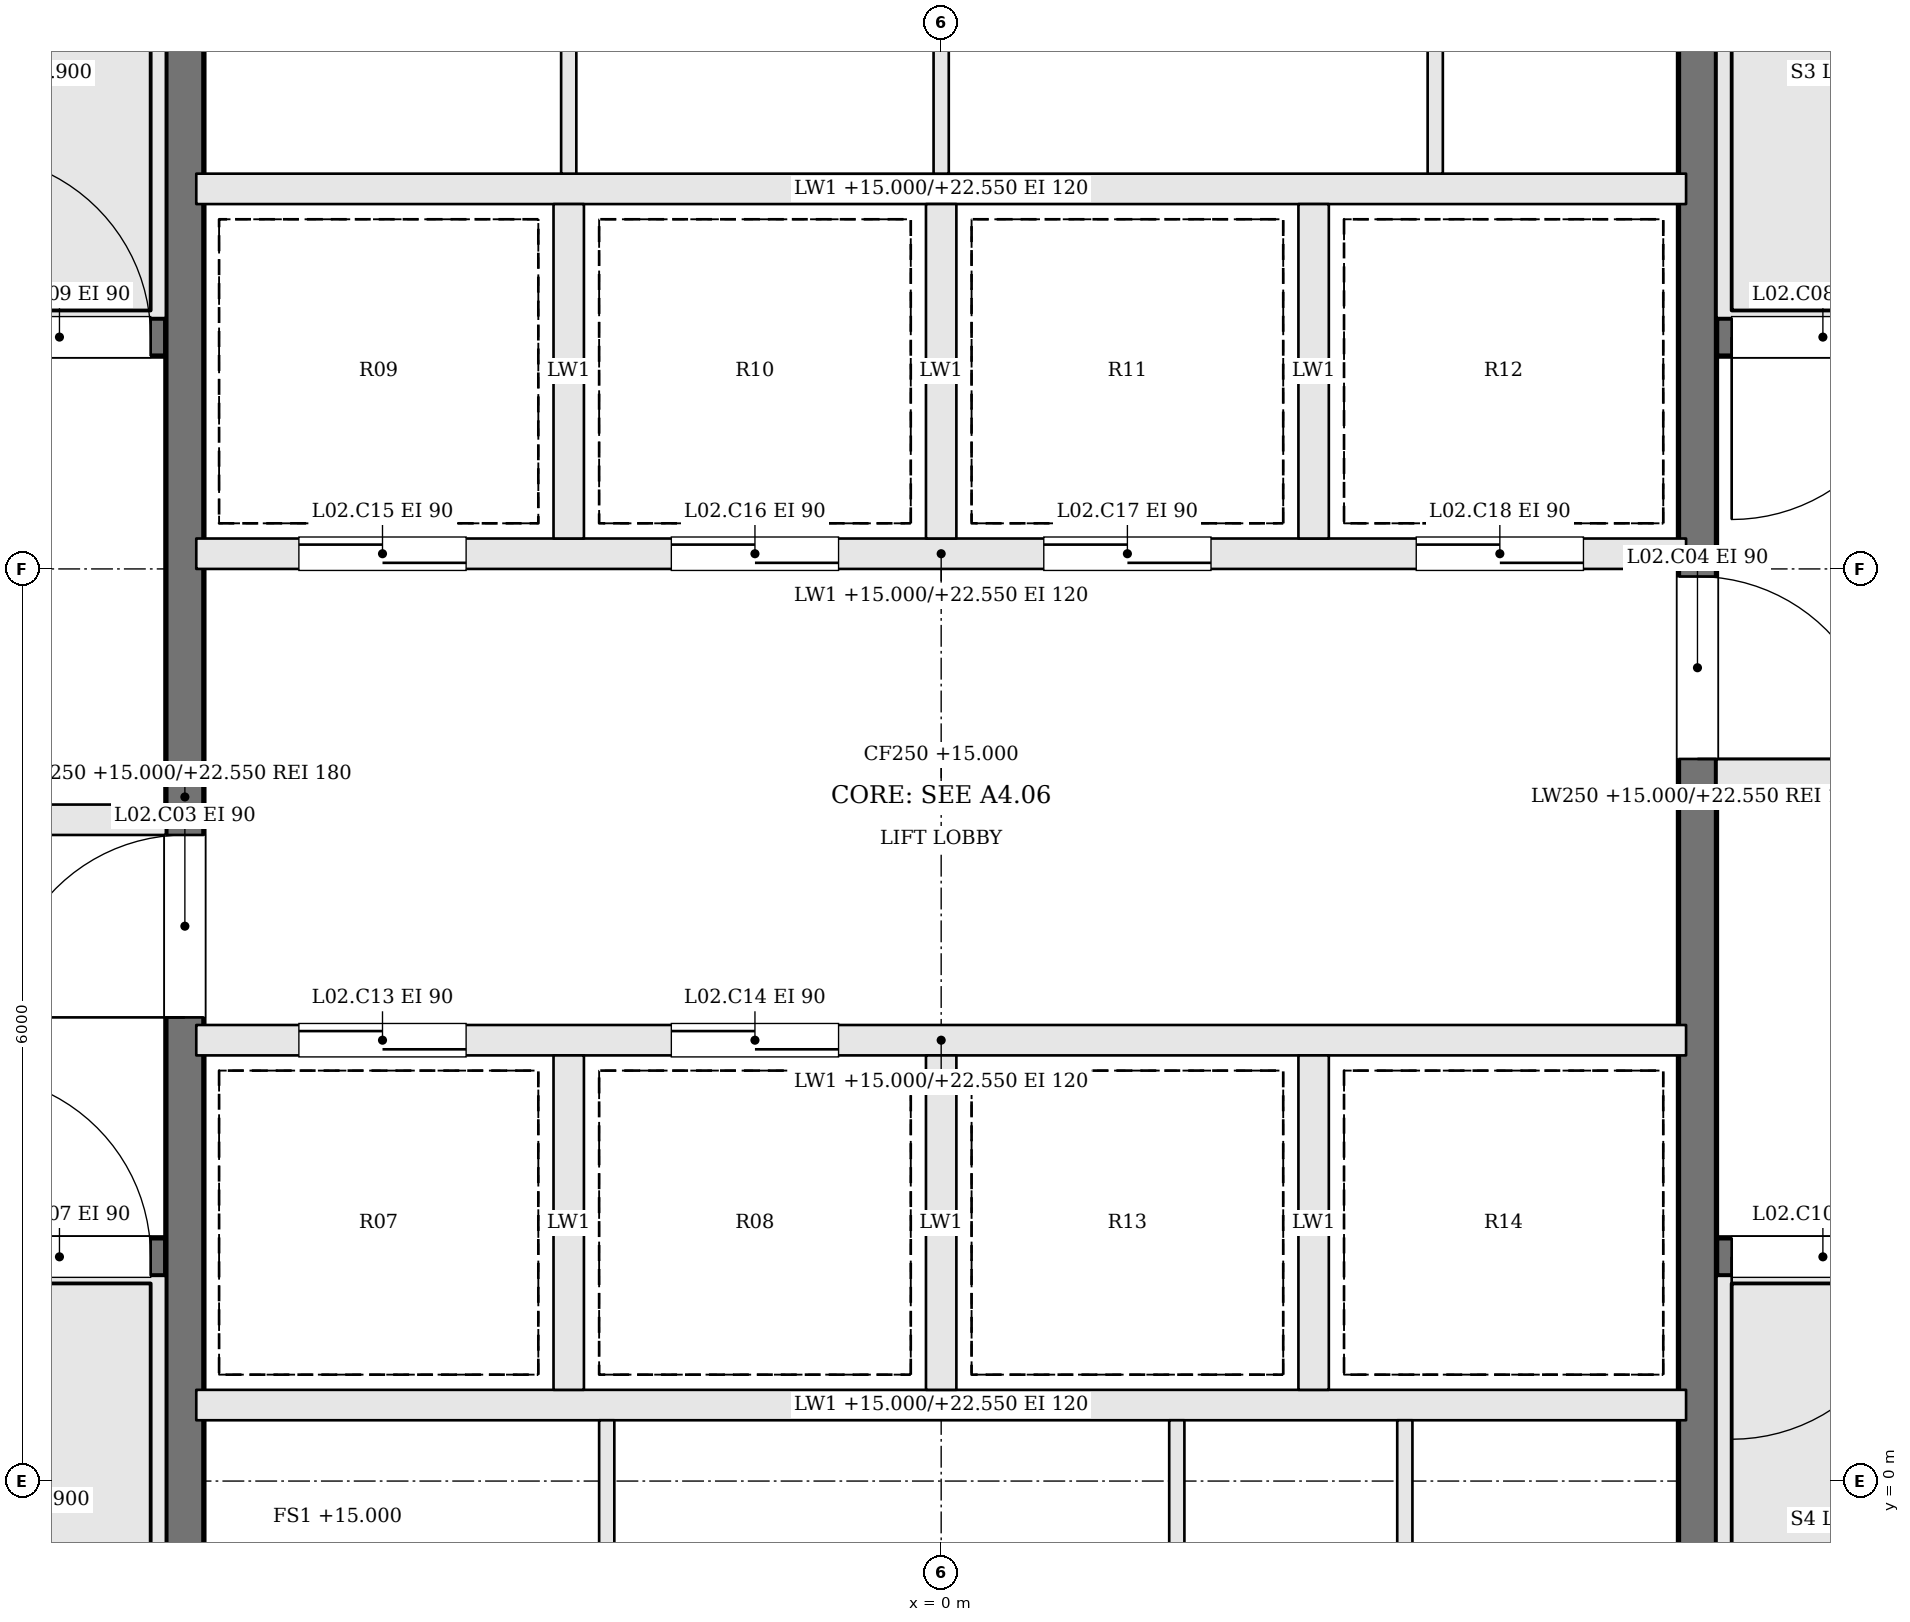
"""IFC4 building model, lengths in metres.
Left out: names, types, materials, properties, quantities, classifications, styles, units other than length and angle.
Written with IfcOpenShell. Run it as: python <this file> out.ifc"""

import sys

from ifc_helpers import new_model, si_unit, direction, frame, frame_2d, origin, place, context, subcontext, project, spatial, rectangle, extrude, element, fill, save


model = new_model("IFC4")
c1 = context("Model", 3, precision=1e-05, world=origin(), true_north=direction((0.0, 1.0)))
c2 = subcontext(c1, "Body", "Model", "MODEL_VIEW")
j1 = project(units=[si_unit("LENGTHUNIT", "METRE"), si_unit("PLANEANGLEUNIT", "RADIAN")], contexts=[c1])
p1 = place(None, origin())
s1 = spatial("IfcSite", under=j1, at=p1, CompositionType="ELEMENT")
p2 = place(p1, origin())
s2 = spatial("IfcBuilding", under=s1, at=p2, CompositionType="ELEMENT")
p3 = place(p2, frame((0.0, 0.0, 15.0)))
s3 = spatial("IfcBuildingStorey", under=s2, at=p3, CompositionType="ELEMENT", Elevation=15.0)
p4 = place(p3, frame((-11.6, 1.475, 0.0), z_axis=(0.0, 0.0, 1.0), x_axis=(1.0, 0.0, 0.0)))
e1 = element("IfcWall", 1, at=p4, inside=s3, PredefinedType="SOLIDWALL", context=c2, shape_type="SweptSolid", body=[
    extrude(rectangle(XDim=6.5, YDim=0.25, at=frame_2d((3.25, 0.0))), origin(), (0.0, 0.0, 1.0), 7.55),
])
p5 = place(p4, frame((5.2, 0.0, 0.0)))
e2 = element("IfcOpeningElement", 2, at=p5, cuts=e1, PredefinedType="OPENING", context=c2, shape_type="SweptSolid", body=[
    extrude(rectangle(XDim=1.2, YDim=2.1, at=frame_2d((0.6, 1.05))), frame((0.0, 0.135, 0.0), z_axis=(0.0, -1.0, 0.0), x_axis=(1.0, 0.0, 0.0)), (0.0, 0.0, 1.0), 0.27),
])
p6 = place(p3, frame((11.6, 7.525, 0.0), z_axis=(0.0, 0.0, 1.0), x_axis=(-1.0, 0.0, 0.0)))
e3 = element("IfcWall", 3, at=p6, inside=s3, PredefinedType="SOLIDWALL", context=c2, shape_type="SweptSolid", body=[
    extrude(rectangle(XDim=6.5, YDim=0.25, at=frame_2d((3.25, 0.0))), origin(), (0.0, 0.0, 1.0), 7.55),
])
p7 = place(p6, frame((5.2, 0.0, 0.0)))
e4 = element("IfcOpeningElement", 4, at=p7, cuts=e3, PredefinedType="OPENING", context=c2, shape_type="SweptSolid", body=[
    extrude(rectangle(XDim=1.2, YDim=2.1, at=frame_2d((0.6, 1.05))), frame((0.0, 0.135, 0.0), z_axis=(0.0, -1.0, 0.0), x_axis=(1.0, 0.0, 0.0)), (0.0, 0.0, 1.0), 0.27),
])
p8 = place(p3, frame((-11.6, 4.35, 0.0), z_axis=(0.0, 0.0, 1.0), x_axis=(1.0, 0.0, 0.0)))
e5 = element("IfcWall", 5, at=p8, inside=s3, PredefinedType="SOLIDWALL", context=c2, shape_type="SweptSolid", body=[
    extrude(rectangle(XDim=6.5, YDim=0.2, at=frame_2d((3.25, 0.0))), origin(), (0.0, 0.0, 1.0), 7.55),
])
p9 = place(p8, frame((3.8, 0.0, 0.0)))
e6 = element("IfcOpeningElement", 6, at=p9, cuts=e5, PredefinedType="OPENING", context=c2, shape_type="SweptSolid", body=[
    extrude(rectangle(XDim=1.2, YDim=2.1, at=frame_2d((0.6, 1.05))), frame((0.0, 0.11, 0.0), z_axis=(0.0, -1.0, 0.0), x_axis=(1.0, 0.0, 0.0)), (0.0, 0.0, 1.0), 0.22),
])
p10 = place(p8, frame((0.5, 0.0, 0.0)))
e7 = element("IfcOpeningElement", 7, at=p10, cuts=e5, PredefinedType="OPENING", context=c2, shape_type="SweptSolid", body=[
    extrude(rectangle(XDim=1.2, YDim=2.1, at=frame_2d((0.6, 1.05))), frame((0.0, 0.11, 0.0), z_axis=(0.0, -1.0, 0.0), x_axis=(1.0, 0.0, 0.0)), (0.0, 0.0, 1.0), 0.22),
])
p11 = place(p3, frame((11.6, 4.65, 0.0), z_axis=(0.0, 0.0, 1.0), x_axis=(-1.0, 0.0, 0.0)))
e8 = element("IfcWall", 8, at=p11, inside=s3, PredefinedType="SOLIDWALL", context=c2, shape_type="SweptSolid", body=[
    extrude(rectangle(XDim=6.5, YDim=0.2, at=frame_2d((3.25, 0.0))), origin(), (0.0, 0.0, 1.0), 7.55),
])
p12 = place(p11, frame((3.8, 0.0, 0.0)))
e9 = element("IfcOpeningElement", 9, at=p12, cuts=e8, PredefinedType="OPENING", context=c2, shape_type="SweptSolid", body=[
    extrude(rectangle(XDim=1.2, YDim=2.1, at=frame_2d((0.6, 1.05))), frame((0.0, 0.11, 0.0), z_axis=(0.0, -1.0, 0.0), x_axis=(1.0, 0.0, 0.0)), (0.0, 0.0, 1.0), 0.22),
])
p13 = place(p11, frame((0.5, 0.0, 0.0)))
e10 = element("IfcOpeningElement", 10, at=p13, cuts=e8, PredefinedType="OPENING", context=c2, shape_type="SweptSolid", body=[
    extrude(rectangle(XDim=1.2, YDim=2.1, at=frame_2d((0.6, 1.05))), frame((0.0, 0.11, 0.0), z_axis=(0.0, -1.0, 0.0), x_axis=(1.0, 0.0, 0.0)), (0.0, 0.0, 1.0), 0.22),
])
p14 = place(p3, frame((-11.6, 7.525, 0.0), z_axis=(0.0, 0.0, 1.0), x_axis=(1.0, 0.0, 0.0)))
e11 = element("IfcWall", 11, at=p14, inside=s3, PredefinedType="SOLIDWALL", context=c2, shape_type="SweptSolid", body=[
    extrude(rectangle(XDim=6.5, YDim=0.25, at=frame_2d((3.25, 0.0))), origin(), (0.0, 0.0, 1.0), 7.55),
])
p15 = place(p14, frame((5.2, 0.0, 0.0)))
e12 = element("IfcOpeningElement", 12, at=p15, cuts=e11, PredefinedType="OPENING", context=c2, shape_type="SweptSolid", body=[
    extrude(rectangle(XDim=1.2, YDim=2.1, at=frame_2d((0.6, 1.05))), frame((0.0, 0.135, 0.0), z_axis=(0.0, -1.0, 0.0), x_axis=(1.0, 0.0, 0.0)), (0.0, 0.0, 1.0), 0.27),
])
p16 = place(p3, frame((11.6, 1.475, 0.0), z_axis=(0.0, 0.0, 1.0), x_axis=(-1.0, 0.0, 0.0)))
e13 = element("IfcWall", 13, at=p16, inside=s3, PredefinedType="SOLIDWALL", context=c2, shape_type="SweptSolid", body=[
    extrude(rectangle(XDim=6.5, YDim=0.25, at=frame_2d((3.25, 0.0))), origin(), (0.0, 0.0, 1.0), 7.55),
])
p17 = place(p16, frame((5.2, 0.0, 0.0)))
e14 = element("IfcOpeningElement", 14, at=p17, cuts=e13, PredefinedType="OPENING", context=c2, shape_type="SweptSolid", body=[
    extrude(rectangle(XDim=1.2, YDim=2.1, at=frame_2d((0.6, 1.05))), frame((0.0, 0.135, 0.0), z_axis=(0.0, -1.0, 0.0), x_axis=(1.0, 0.0, 0.0)), (0.0, 0.0, 1.0), 0.27),
])
p18 = place(p3, frame((-4.975, -1.6, 0.0), z_axis=(0.0, 0.0, 1.0), x_axis=(0.0, 1.0, 0.0)))
e15 = element("IfcWall", 15, at=p18, inside=s3, PredefinedType="SOLIDWALL", context=c2, shape_type="SweptSolid", body=[
    extrude(rectangle(XDim=12.2, YDim=0.25, at=frame_2d((6.1, 0.0))), origin(), (0.0, 0.0, 1.0), 7.55),
])
p19 = place(p18, frame((4.65, 0.0, 0.0)))
e16 = element("IfcOpeningElement", 16, at=p19, cuts=e15, PredefinedType="OPENING", context=c2, shape_type="SweptSolid", body=[
    extrude(rectangle(XDim=1.2, YDim=2.1, at=frame_2d((0.6, 1.05))), frame((0.0, 0.135, 0.0), z_axis=(0.0, -1.0, 0.0), x_axis=(1.0, 0.0, 0.0)), (0.0, 0.0, 1.0), 0.27),
])
p20 = place(p3, frame((4.975, 10.6, 0.0), z_axis=(0.0, 0.0, 1.0), x_axis=(0.0, -1.0, 0.0)))
e17 = element("IfcWall", 17, at=p20, inside=s3, PredefinedType="SOLIDWALL", context=c2, shape_type="SweptSolid", body=[
    extrude(rectangle(XDim=12.2, YDim=0.25, at=frame_2d((6.1, 0.0))), origin(), (0.0, 0.0, 1.0), 7.55),
])
p21 = place(p20, frame((4.65, 0.0, 0.0)))
e18 = element("IfcOpeningElement", 18, at=p21, cuts=e17, PredefinedType="OPENING", context=c2, shape_type="SweptSolid", body=[
    extrude(rectangle(XDim=1.2, YDim=2.1, at=frame_2d((0.6, 1.05))), frame((0.0, 0.135, 0.0), z_axis=(0.0, -1.0, 0.0), x_axis=(1.0, 0.0, 0.0)), (0.0, 0.0, 1.0), 0.27),
])
p22 = place(p3, frame((-4.9, 0.5, 0.0), z_axis=(0.0, 0.0, 1.0), x_axis=(1.0, 0.0, 0.0)))
e19 = element("IfcWall", 19, at=p22, inside=s3, PredefinedType="SOLIDWALL", context=c2, shape_type="SweptSolid", body=[
    extrude(rectangle(XDim=9.8, YDim=0.2, at=frame_2d((4.9, 0.0))), origin(), (0.0, 0.0, 1.0), 7.55),
])
p23 = place(p3, frame((-4.9, 2.9, 0.0), z_axis=(0.0, 0.0, 1.0), x_axis=(1.0, 0.0, 0.0)))
e20 = element("IfcWall", 20, at=p23, inside=s3, PredefinedType="SOLIDWALL", context=c2, shape_type="SweptSolid", body=[
    extrude(rectangle(XDim=9.8, YDim=0.2, at=frame_2d((4.9, 0.0))), origin(), (0.0, 0.0, 1.0), 7.55),
])
p24 = place(p23, frame((0.675, 0.0, 0.0)))
e21 = element("IfcOpeningElement", 21, at=p24, cuts=e20, PredefinedType="OPENING", context=c2, shape_type="SweptSolid", body=[
    extrude(rectangle(XDim=1.1, YDim=2.1, at=frame_2d((0.55, 1.05))), frame((0.0, 0.11, 0.0), z_axis=(0.0, -1.0, 0.0), x_axis=(1.0, 0.0, 0.0)), (0.0, 0.0, 1.0), 0.22),
])
p25 = place(p23, frame((3.125, 0.0, 0.0)))
e22 = element("IfcOpeningElement", 22, at=p25, cuts=e20, PredefinedType="OPENING", context=c2, shape_type="SweptSolid", body=[
    extrude(rectangle(XDim=1.1, YDim=2.1, at=frame_2d((0.55, 1.05))), frame((0.0, 0.11, 0.0), z_axis=(0.0, -1.0, 0.0), x_axis=(1.0, 0.0, 0.0)), (0.0, 0.0, 1.0), 0.22),
])
p26 = place(p3, frame((-4.9, 6.1, 0.0), z_axis=(0.0, 0.0, 1.0), x_axis=(1.0, 0.0, 0.0)))
e23 = element("IfcWall", 23, at=p26, inside=s3, PredefinedType="SOLIDWALL", context=c2, shape_type="SweptSolid", body=[
    extrude(rectangle(XDim=9.8, YDim=0.2, at=frame_2d((4.9, 0.0))), origin(), (0.0, 0.0, 1.0), 7.55),
])
p27 = place(p26, frame((0.675, 0.0, 0.0)))
e24 = element("IfcOpeningElement", 24, at=p27, cuts=e23, PredefinedType="OPENING", context=c2, shape_type="SweptSolid", body=[
    extrude(rectangle(XDim=1.1, YDim=2.1, at=frame_2d((0.55, 1.05))), frame((0.0, 0.11, 0.0), z_axis=(0.0, -1.0, 0.0), x_axis=(1.0, 0.0, 0.0)), (0.0, 0.0, 1.0), 0.22),
])
p28 = place(p26, frame((3.125, 0.0, 0.0)))
e25 = element("IfcOpeningElement", 25, at=p28, cuts=e23, PredefinedType="OPENING", context=c2, shape_type="SweptSolid", body=[
    extrude(rectangle(XDim=1.1, YDim=2.1, at=frame_2d((0.55, 1.05))), frame((0.0, 0.11, 0.0), z_axis=(0.0, -1.0, 0.0), x_axis=(1.0, 0.0, 0.0)), (0.0, 0.0, 1.0), 0.22),
])
p29 = place(p26, frame((5.575, 0.0, 0.0)))
e26 = element("IfcOpeningElement", 26, at=p29, cuts=e23, PredefinedType="OPENING", context=c2, shape_type="SweptSolid", body=[
    extrude(rectangle(XDim=1.1, YDim=2.1, at=frame_2d((0.55, 1.05))), frame((0.0, 0.11, 0.0), z_axis=(0.0, -1.0, 0.0), x_axis=(1.0, 0.0, 0.0)), (0.0, 0.0, 1.0), 0.22),
])
p30 = place(p26, frame((8.025, 0.0, 0.0)))
e27 = element("IfcOpeningElement", 27, at=p30, cuts=e23, PredefinedType="OPENING", context=c2, shape_type="SweptSolid", body=[
    extrude(rectangle(XDim=1.1, YDim=2.1, at=frame_2d((0.55, 1.05))), frame((0.0, 0.11, 0.0), z_axis=(0.0, -1.0, 0.0), x_axis=(1.0, 0.0, 0.0)), (0.0, 0.0, 1.0), 0.22),
])
p31 = place(p3, frame((-4.9, 8.5, 0.0), z_axis=(0.0, 0.0, 1.0), x_axis=(1.0, 0.0, 0.0)))
e28 = element("IfcWall", 28, at=p31, inside=s3, PredefinedType="SOLIDWALL", context=c2, shape_type="SweptSolid", body=[
    extrude(rectangle(XDim=9.8, YDim=0.2, at=frame_2d((4.9, 0.0))), origin(), (0.0, 0.0, 1.0), 7.55),
])
for number, where, z_axis, x_axis in (
    (29, (-2.45, 0.6, 0.0), (0.0, 0.0, 1.0), (0.0, 1.0, 0.0)),
    (30, (0.0, 0.6, 0.0), (0.0, 0.0, 1.0), (0.0, 1.0, 0.0)),
    (31, (2.45, 0.6, 0.0), (0.0, 0.0, 1.0), (0.0, 1.0, 0.0)),
    (32, (-2.45, 6.2, 0.0), (0.0, 0.0, 1.0), (0.0, 1.0, 0.0)),
    (33, (0.0, 6.2, 0.0), (0.0, 0.0, 1.0), (0.0, 1.0, 0.0)),
    (34, (2.45, 6.2, 0.0), (0.0, 0.0, 1.0), (0.0, 1.0, 0.0)),
):
    element("IfcWall", number, at=place(p3, frame(where, z_axis=z_axis, x_axis=x_axis)), inside=s3, PredefinedType="SOLIDWALL", context=c2, shape_type="SweptSolid", body=[
        extrude(rectangle(XDim=2.2, YDim=0.2, at=frame_2d((1.1, 0.0))), origin(), (0.0, 0.0, 1.0), 7.55),
    ])
for number, where, z_axis, x_axis in (
    (35, (-2.2, -1.6, 0.0), (0.0, 0.0, 1.0), (0.0, 1.0, 0.0)),
    (36, (1.55, -1.6, 0.0), (0.0, 0.0, 1.0), (0.0, 1.0, 0.0)),
    (37, (3.05, -1.6, 0.0), (0.0, 0.0, 1.0), (0.0, 1.0, 0.0)),
    (38, (-2.45, 8.6, 0.0), (0.0, 0.0, 1.0), (0.0, 1.0, 0.0)),
    (39, (0.0, 8.6, 0.0), (0.0, 0.0, 1.0), (0.0, 1.0, 0.0)),
    (40, (3.25, 8.6, 0.0), (0.0, 0.0, 1.0), (0.0, 1.0, 0.0)),
):
    element("IfcWall", number, at=place(p3, frame(where, z_axis=z_axis, x_axis=x_axis)), inside=s3, PredefinedType="PARTITIONING", context=c2, shape_type="SweptSolid", body=[
        extrude(rectangle(XDim=2.0, YDim=0.1, at=frame_2d((1.0, 0.0))), origin(), (0.0, 0.0, 1.0), 7.55),
    ])
p32 = place(p19, origin())
e41 = element("IfcDoor", 41, at=p32, inside=s3, OperationType="SINGLE_SWING_LEFT", PredefinedType="DOOR", context=c2, shape_type="SweptSolid", body=[
    extrude(rectangle(XDim=1.2, YDim=2.1, at=frame_2d((0.6, 1.05))), frame((0.0, 0.025, 0.0), z_axis=(0.0, -1.0, 0.0), x_axis=(1.0, 0.0, 0.0)), (0.0, 0.0, 1.0), 0.05),
])
fill(e16, e41)
p33 = place(p21, origin())
e42 = element("IfcDoor", 42, at=p33, inside=s3, OperationType="SINGLE_SWING_RIGHT", PredefinedType="DOOR", context=c2, shape_type="SweptSolid", body=[
    extrude(rectangle(XDim=1.2, YDim=2.1, at=frame_2d((0.6, 1.05))), frame((0.0, 0.025, 0.0), z_axis=(0.0, -1.0, 0.0), x_axis=(1.0, 0.0, 0.0)), (0.0, 0.0, 1.0), 0.05),
])
fill(e18, e42)
p34 = place(p5, origin())
e43 = element("IfcDoor", 43, at=p34, inside=s3, OperationType="SINGLE_SWING_LEFT", PredefinedType="DOOR", context=c2, shape_type="SweptSolid", body=[
    extrude(rectangle(XDim=1.2, YDim=2.1, at=frame_2d((0.6, 1.05))), frame((0.0, 0.025, 0.0), z_axis=(0.0, -1.0, 0.0), x_axis=(1.0, 0.0, 0.0)), (0.0, 0.0, 1.0), 0.05),
])
fill(e2, e43)
p35 = place(p7, origin())
e44 = element("IfcDoor", 44, at=p35, inside=s3, OperationType="SINGLE_SWING_RIGHT", PredefinedType="DOOR", context=c2, shape_type="SweptSolid", body=[
    extrude(rectangle(XDim=1.2, YDim=2.1, at=frame_2d((0.6, 1.05))), frame((0.0, 0.025, 0.0), z_axis=(0.0, -1.0, 0.0), x_axis=(1.0, 0.0, 0.0)), (0.0, 0.0, 1.0), 0.05),
])
fill(e4, e44)
p36 = place(p15, origin())
e45 = element("IfcDoor", 45, at=p36, inside=s3, OperationType="SINGLE_SWING_LEFT", PredefinedType="DOOR", context=c2, shape_type="SweptSolid", body=[
    extrude(rectangle(XDim=1.2, YDim=2.1, at=frame_2d((0.6, 1.05))), frame((0.0, 0.025, 0.0), z_axis=(0.0, -1.0, 0.0), x_axis=(1.0, 0.0, 0.0)), (0.0, 0.0, 1.0), 0.05),
])
fill(e12, e45)
p37 = place(p17, origin())
e46 = element("IfcDoor", 46, at=p37, inside=s3, OperationType="SINGLE_SWING_RIGHT", PredefinedType="DOOR", context=c2, shape_type="SweptSolid", body=[
    extrude(rectangle(XDim=1.2, YDim=2.1, at=frame_2d((0.6, 1.05))), frame((0.0, 0.025, 0.0), z_axis=(0.0, -1.0, 0.0), x_axis=(1.0, 0.0, 0.0)), (0.0, 0.0, 1.0), 0.05),
])
fill(e14, e46)
p38 = place(p24, origin())
e47 = element("IfcDoor", 47, at=p38, inside=s3, OperationType="SLIDING_TO_RIGHT", PredefinedType="DOOR", context=c2, shape_type="SweptSolid", body=[
    extrude(rectangle(XDim=1.1, YDim=2.1, at=frame_2d((0.55, 1.05))), frame((0.0, 0.025, 0.0), z_axis=(0.0, -1.0, 0.0), x_axis=(1.0, 0.0, 0.0)), (0.0, 0.0, 1.0), 0.05),
])
fill(e21, e47)
p39 = place(p25, origin())
e48 = element("IfcDoor", 48, at=p39, inside=s3, OperationType="SLIDING_TO_LEFT", PredefinedType="DOOR", context=c2, shape_type="SweptSolid", body=[
    extrude(rectangle(XDim=1.1, YDim=2.1, at=frame_2d((0.55, 1.05))), frame((0.0, 0.025, 0.0), z_axis=(0.0, -1.0, 0.0), x_axis=(1.0, 0.0, 0.0)), (0.0, 0.0, 1.0), 0.05),
])
fill(e22, e48)
p40 = place(p27, origin())
e49 = element("IfcDoor", 49, at=p40, inside=s3, OperationType="SLIDING_TO_RIGHT", PredefinedType="DOOR", context=c2, shape_type="SweptSolid", body=[
    extrude(rectangle(XDim=1.1, YDim=2.1, at=frame_2d((0.55, 1.05))), frame((0.0, 0.025, 0.0), z_axis=(0.0, -1.0, 0.0), x_axis=(1.0, 0.0, 0.0)), (0.0, 0.0, 1.0), 0.05),
])
fill(e24, e49)
p41 = place(p28, origin())
e50 = element("IfcDoor", 50, at=p41, inside=s3, OperationType="SLIDING_TO_LEFT", PredefinedType="DOOR", context=c2, shape_type="SweptSolid", body=[
    extrude(rectangle(XDim=1.1, YDim=2.1, at=frame_2d((0.55, 1.05))), frame((0.0, 0.025, 0.0), z_axis=(0.0, -1.0, 0.0), x_axis=(1.0, 0.0, 0.0)), (0.0, 0.0, 1.0), 0.05),
])
fill(e25, e50)
p42 = place(p29, origin())
e51 = element("IfcDoor", 51, at=p42, inside=s3, OperationType="SLIDING_TO_RIGHT", PredefinedType="DOOR", context=c2, shape_type="SweptSolid", body=[
    extrude(rectangle(XDim=1.1, YDim=2.1, at=frame_2d((0.55, 1.05))), frame((0.0, 0.025, 0.0), z_axis=(0.0, -1.0, 0.0), x_axis=(1.0, 0.0, 0.0)), (0.0, 0.0, 1.0), 0.05),
])
fill(e26, e51)
p43 = place(p30, origin())
e52 = element("IfcDoor", 52, at=p43, inside=s3, OperationType="SLIDING_TO_LEFT", PredefinedType="DOOR", context=c2, shape_type="SweptSolid", body=[
    extrude(rectangle(XDim=1.1, YDim=2.1, at=frame_2d((0.55, 1.05))), frame((0.0, 0.025, 0.0), z_axis=(0.0, -1.0, 0.0), x_axis=(1.0, 0.0, 0.0)), (0.0, 0.0, 1.0), 0.05),
])
fill(e27, e52)
save(model, sys.argv[1])
